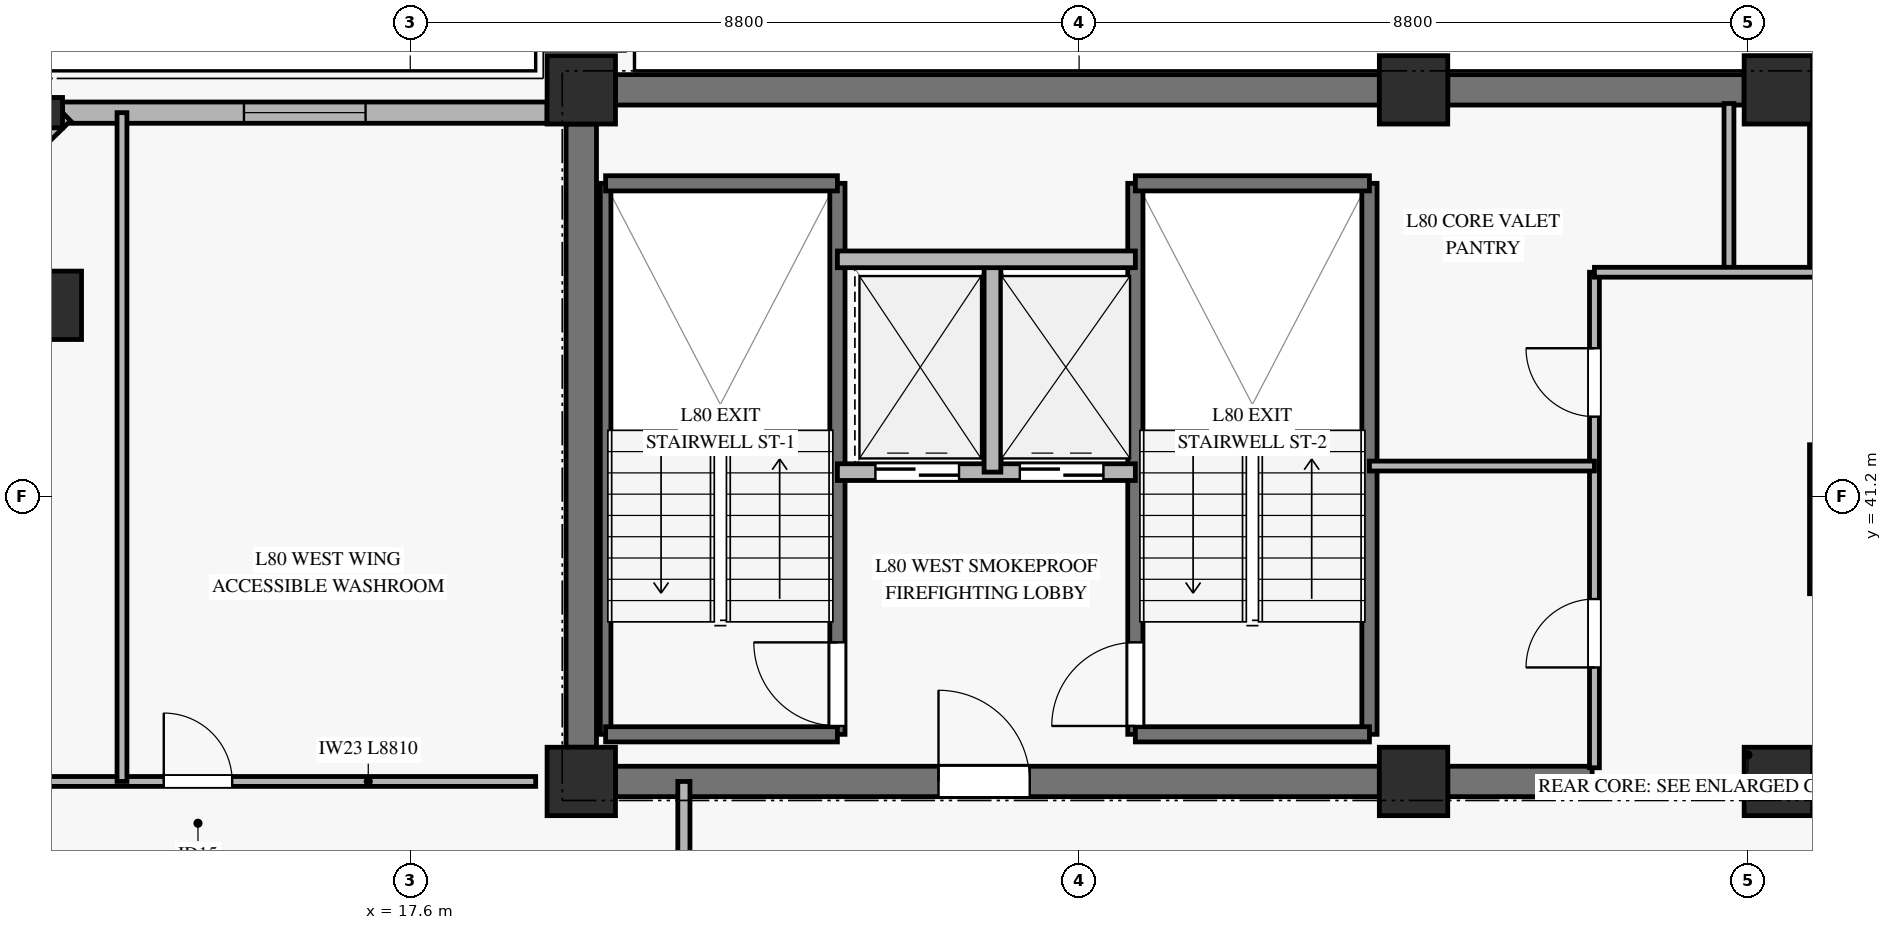
"""IFC4 building model, lengths in metres.
Left out: names, types, materials, properties, quantities, classifications, styles, units other than length and angle.
Written with IfcOpenShell. Run it as: python <this file> out.ifc"""

import sys

from ifc_helpers import new_model, si_unit, direction, frame, frame_2d, origin, origin_2d, place, context, subcontext, project, spatial, rectangle, hollow_rectangle, extrude, source, transform, mapped, element, fill, save


model = new_model("IFC4")
c1 = context("Model", 3, precision=1e-05, world=origin(), true_north=direction((0.0, 1.0)))
c2 = subcontext(c1, "Body", "Model", "MODEL_VIEW")
j1 = project(units=[si_unit("LENGTHUNIT", "METRE"), si_unit("PLANEANGLEUNIT", "RADIAN")], contexts=[c1])
p1 = place(None, origin())
s1 = spatial("IfcSite", under=j1, at=p1, CompositionType="ELEMENT")
p2 = place(p1, origin())
s2 = spatial("IfcBuilding", under=s1, at=p2, CompositionType="ELEMENT")
p3 = place(p2, frame((0.0, 0.0, 310.8)))
s3 = spatial("IfcBuildingStorey", under=s2, at=p3, CompositionType="ELEMENT", Elevation=310.8)
m1 = source(origin(), c2, "Body", "SweptSolid", [
    extrude(rectangle(XDim=0.9, YDim=0.9, at=origin_2d()), origin(), (0.0, 0.0, 1.0), 3.185),
])
for number, where, z_axis, x_axis in (
    (1, (19.85, 37.45, 0.0), (0.0, 0.0, 1.0), (1.0, 0.0, 0.0)),
    (2, (19.85, 46.55, 0.0), (0.0, 0.0, 1.0), (1.0, 0.0, 0.0)),
    (3, (30.8, 37.45, 0.0), (0.0, 0.0, 1.0), (1.0, 0.0, 0.0)),
    (4, (30.8, 46.55, 0.0), (0.0, 0.0, 1.0), (1.0, 0.0, 0.0)),
    (5, (35.6, 37.45, 0.0), (0.0, 0.0, 1.0), (1.0, 0.0, 0.0)),
    (6, (35.6, 46.55, 0.0), (0.0, 0.0, 1.0), (1.0, 0.0, 0.0)),
):
    element("IfcColumn", number, at=place(p3, frame(where, z_axis=z_axis, x_axis=x_axis)), inside=s3, PredefinedType="PILASTER", context=c2, shape_type="MappedRepresentation", body=[
        mapped(m1, transform((0.0, 0.0, 0.0), x_axis=(1.0, 0.0, 0.0), y_axis=(0.0, 1.0, 0.0), z_axis=(0.0, 0.0, 1.0), scale=1.0)),
    ])
p4 = place(p3, frame((20.3, 46.55, 0.0), z_axis=(0.0, 0.0, 1.0), x_axis=(1.0, 0.0, 0.0)))
e7 = element("IfcWall", 7, at=p4, inside=s3, PredefinedType="SHEAR", context=c2, shape_type="SweptSolid", body=[
    extrude(rectangle(XDim=10.05, YDim=0.4, at=frame_2d((5.025, 0.0))), origin(), (0.0, 0.0, 1.0), 3.185),
])
p5 = place(p3, frame((31.25, 46.55, 0.0), z_axis=(0.0, 0.0, 1.0), x_axis=(1.0, 0.0, 0.0)))
e8 = element("IfcWall", 8, at=p5, inside=s3, PredefinedType="SHEAR", context=c2, shape_type="SweptSolid", body=[
    extrude(rectangle(XDim=3.9, YDim=0.4, at=frame_2d((1.95, 0.0))), origin(), (0.0, 0.0, 1.0), 3.185),
])
p6 = place(p3, frame((36.05, 46.55, 0.0), z_axis=(0.0, 0.0, 1.0), x_axis=(1.0, 0.0, 0.0)))
e9 = element("IfcWall", 9, at=p6, inside=s3, PredefinedType="SHEAR", context=c2, shape_type="SweptSolid", body=[
    extrude(rectangle(XDim=7.8, YDim=0.4, at=frame_2d((3.9, 0.0))), origin(), (0.0, 0.0, 1.0), 3.185),
])
p7 = place(p3, frame((20.3, 37.45, 0.0), z_axis=(0.0, 0.0, 1.0), x_axis=(1.0, 0.0, 0.0)))
e10 = element("IfcWall", 10, at=p7, inside=s3, PredefinedType="SHEAR", context=c2, shape_type="SweptSolid", body=[
    extrude(rectangle(XDim=10.05, YDim=0.4, at=frame_2d((5.025, 0.0))), origin(), (0.0, 0.0, 1.0), 3.185),
])
p8 = place(p7, frame((4.25, 0.0, 0.0)))
e11 = element("IfcOpeningElement", 11, at=p8, cuts=e10, PredefinedType="OPENING", context=c2, shape_type="SweptSolid", body=[
    extrude(rectangle(XDim=1.2, YDim=2.15, at=frame_2d((0.6, 1.075))), frame((0.0, 0.21, 0.0), z_axis=(0.0, -1.0, 0.0), x_axis=(1.0, 0.0, 0.0)), (0.0, 0.0, 1.0), 0.42),
])
p9 = place(p3, frame((31.25, 37.45, 0.0), z_axis=(0.0, 0.0, 1.0), x_axis=(1.0, 0.0, 0.0)))
e12 = element("IfcWall", 12, at=p9, inside=s3, PredefinedType="SHEAR", context=c2, shape_type="SweptSolid", body=[
    extrude(rectangle(XDim=1.9, YDim=0.4, at=frame_2d((0.95, 0.0))), origin(), (0.0, 0.0, 1.0), 3.185),
])
p10 = place(p3, frame((36.05, 37.45, 0.0), z_axis=(0.0, 0.0, 1.0), x_axis=(1.0, 0.0, 0.0)))
e13 = element("IfcWall", 13, at=p10, inside=s3, PredefinedType="SHEAR", context=c2, shape_type="SweptSolid", body=[
    extrude(rectangle(XDim=7.8, YDim=0.4, at=frame_2d((3.9, 0.0))), origin(), (0.0, 0.0, 1.0), 3.185),
])
p11 = place(p3, frame((19.85, 37.9, 0.0), z_axis=(0.0, 0.0, 1.0), x_axis=(0.0, 1.0, 0.0)))
e14 = element("IfcWall", 14, at=p11, inside=s3, PredefinedType="SHEAR", context=c2, shape_type="SweptSolid", body=[
    extrude(rectangle(XDim=8.2, YDim=0.4, at=frame_2d((4.1, 0.0))), origin(), (0.0, 0.0, 1.0), 3.185),
])
m2 = source(origin(), c2, "Body", "SweptSolid", [
    extrude(hollow_rectangle(XDim=0.9, YDim=0.9, WallThickness=0.04, at=origin_2d()), origin(), (0.0, 0.0, 1.0), 3.207),
])
p12 = place(p3, frame((12.825, 43.715, 0.0), z_axis=(0.114814147979, 0.014618246958, 0.993279426083), x_axis=(-0.126301358356, 0.991991918756, 0.0)))
e15 = element("IfcColumn", 15, at=p12, inside=s3, PredefinedType="COLUMN", context=c2, shape_type="MappedRepresentation", body=[
    mapped(m2, transform((0.0, 0.0, 0.0), x_axis=(1.0, 0.0, 0.0), y_axis=(0.0, 1.0, 0.0), z_axis=(0.0, 0.0, 1.0), scale=1.0)),
])
m3 = source(origin(), c2, "Body", "SweptSolid", [
    extrude(hollow_rectangle(XDim=0.4, YDim=0.4, WallThickness=0.02, at=origin_2d()), origin(), (0.0, 0.0, 1.0), 3.206),
])
p13 = place(p3, frame((12.825, 46.25, 0.0), z_axis=(0.114826417444, 0.0, 0.993385571597), x_axis=(0.0, 1.0, 0.0)))
e16 = element("IfcColumn", 16, at=p13, inside=s3, PredefinedType="COLUMN", context=c2, shape_type="MappedRepresentation", body=[
    mapped(m3, transform((0.0, 0.0, 0.0), x_axis=(1.0, 0.0, 0.0), y_axis=(0.0, 1.0, 0.0), z_axis=(0.0, 0.0, 1.0), scale=1.0)),
])
p14 = place(p3, frame((13.025, 46.25, 0.0), z_axis=(0.0, 0.0, 1.0), x_axis=(1.0, 0.0, 0.0)))
e17 = element("IfcWall", 17, at=p14, inside=s3, PredefinedType="SOLIDWALL", context=c2, shape_type="SweptSolid", body=[
    extrude(rectangle(XDim=6.375, YDim=0.28, at=frame_2d((3.188, 0.0))), origin(), (0.0, 0.0, 1.0), 2.815),
])
p15 = place(p14, frame((2.387, 0.0, 0.45)))
e18 = element("IfcOpeningElement", 18, at=p15, cuts=e17, PredefinedType="OPENING", context=c2, shape_type="SweptSolid", body=[
    extrude(rectangle(XDim=1.6, YDim=2.0, at=frame_2d((0.8, 1.0))), frame((0.0, 0.15, 0.0), z_axis=(0.0, -1.0, 0.0), x_axis=(1.0, 0.0, 0.0)), (0.0, 0.0, 1.0), 0.3),
])
p16 = place(p3, frame((13.025, 46.25, 0.0), z_axis=(0.0, 0.0, 1.0), x_axis=(-0.713984922877, -0.700161074257, 0.0)))
e19 = element("IfcWall", 19, at=p16, inside=s3, PredefinedType="SOLIDWALL", context=c2, shape_type="SweptSolid", body=[
    extrude(rectangle(XDim=3.62, YDim=0.3, at=frame_2d((1.81, 0.0))), origin(), (0.0, 0.0, 1.0), 2.815),
])
p17 = place(p16, frame((1.01, 0.0, 0.45)))
e20 = element("IfcOpeningElement", 20, at=p17, cuts=e19, PredefinedType="OPENING", context=c2, shape_type="SweptSolid", body=[
    extrude(rectangle(XDim=1.6, YDim=2.0, at=frame_2d((0.8, 1.0))), frame((0.0, 0.16, 0.0), z_axis=(0.0, -1.0, 0.0), x_axis=(1.0, 0.0, 0.0)), (0.0, 0.0, 1.0), 0.32),
])
p18 = place(p3, frame((20.17, 38.07, 0.0), z_axis=(0.0, 0.0, 1.0), x_axis=(0.0, 1.0, 0.0)))
e21 = element("IfcWall", 21, at=p18, inside=s3, PredefinedType="SOLIDWALL", context=c2, shape_type="SweptSolid", body=[
    extrude(rectangle(XDim=7.25, YDim=0.14, at=frame_2d((3.625, 0.0))), origin(), (0.0, 0.0, 1.0), 3.4),
])
p19 = place(p3, frame((23.22, 38.07, 0.0), z_axis=(0.0, 0.0, 1.0), x_axis=(0.0, 1.0, 0.0)))
e22 = element("IfcWall", 22, at=p19, inside=s3, PredefinedType="SOLIDWALL", context=c2, shape_type="SweptSolid", body=[
    extrude(rectangle(XDim=7.25, YDim=0.2, at=frame_2d((3.625, 0.0))), origin(), (0.0, 0.0, 1.0), 3.4),
])
p20 = place(p19, frame((0.11, 0.0, 0.0)))
e23 = element("IfcOpeningElement", 23, at=p20, cuts=e22, PredefinedType="OPENING", context=c2, shape_type="SweptSolid", body=[
    extrude(rectangle(XDim=1.1, YDim=2.15, at=frame_2d((0.55, 1.075))), frame((0.0, 0.11, 0.0), z_axis=(0.0, -1.0, 0.0), x_axis=(1.0, 0.0, 0.0)), (0.0, 0.0, 1.0), 0.22),
])
for number, where, z_axis, x_axis in (
    (24, (20.17, 45.32, 0.0), (0.0, 0.0, 1.0), (1.0, 0.0, 0.0)),
    (25, (20.17, 38.07, 0.0), (0.0, 0.0, 1.0), (1.0, 0.0, 0.0)),
):
    element("IfcWall", number, at=place(p3, frame(where, z_axis=z_axis, x_axis=x_axis)), inside=s3, PredefinedType="SOLIDWALL", context=c2, shape_type="SweptSolid", body=[
        extrude(rectangle(XDim=3.05, YDim=0.2, at=frame_2d((1.525, 0.0))), origin(), (0.0, 0.0, 1.0), 3.4),
    ])
p21 = place(p3, frame((27.14, 38.07, 0.0), z_axis=(0.0, 0.0, 1.0), x_axis=(0.0, 1.0, 0.0)))
e26 = element("IfcWall", 26, at=p21, inside=s3, PredefinedType="SOLIDWALL", context=c2, shape_type="SweptSolid", body=[
    extrude(rectangle(XDim=7.25, YDim=0.2, at=frame_2d((3.625, 0.0))), origin(), (0.0, 0.0, 1.0), 3.4),
])
p22 = place(p21, frame((0.11, 0.0, 0.0)))
e27 = element("IfcOpeningElement", 27, at=p22, cuts=e26, PredefinedType="OPENING", context=c2, shape_type="SweptSolid", body=[
    extrude(rectangle(XDim=1.1, YDim=2.15, at=frame_2d((0.55, 1.075))), frame((0.0, 0.11, 0.0), z_axis=(0.0, -1.0, 0.0), x_axis=(1.0, 0.0, 0.0)), (0.0, 0.0, 1.0), 0.22),
])
p23 = place(p3, frame((30.22, 38.07, 0.0), z_axis=(0.0, 0.0, 1.0), x_axis=(0.0, 1.0, 0.0)))
e28 = element("IfcWall", 28, at=p23, inside=s3, PredefinedType="SOLIDWALL", context=c2, shape_type="SweptSolid", body=[
    extrude(rectangle(XDim=7.25, YDim=0.2, at=frame_2d((3.625, 0.0))), origin(), (0.0, 0.0, 1.0), 3.4),
])
for number, where, z_axis, x_axis in (
    (29, (27.14, 45.32, 0.0), (0.0, 0.0, 1.0), (1.0, 0.0, 0.0)),
    (30, (27.14, 38.07, 0.0), (0.0, 0.0, 1.0), (1.0, 0.0, 0.0)),
):
    element("IfcWall", number, at=place(p3, frame(where, z_axis=z_axis, x_axis=x_axis)), inside=s3, PredefinedType="SOLIDWALL", context=c2, shape_type="SweptSolid", body=[
        extrude(rectangle(XDim=3.08, YDim=0.2, at=frame_2d((1.54, 0.0))), origin(), (0.0, 0.0, 1.0), 3.4),
    ])
p24 = place(p3, frame((23.22, 41.52, 0.0), z_axis=(0.0, 0.0, 1.0), x_axis=(1.0, 0.0, 0.0)))
e31 = element("IfcWall", 31, at=p24, inside=s3, PredefinedType="SOLIDWALL", context=c2, shape_type="SweptSolid", body=[
    extrude(rectangle(XDim=3.92, YDim=0.22, at=frame_2d((1.96, 0.0))), origin(), (0.0, 0.0, 1.0), 3.185),
])
p25 = place(p24, frame((0.5, 0.0, 0.0)))
e32 = element("IfcOpeningElement", 32, at=p25, cuts=e31, PredefinedType="OPENING", context=c2, shape_type="SweptSolid", body=[
    extrude(rectangle(XDim=1.1, YDim=2.2, at=frame_2d((0.55, 1.1))), frame((0.0, 0.12, 0.0), z_axis=(0.0, -1.0, 0.0), x_axis=(1.0, 0.0, 0.0)), (0.0, 0.0, 1.0), 0.24),
])
p26 = place(p24, frame((2.4, 0.0, 0.0)))
e33 = element("IfcOpeningElement", 33, at=p26, cuts=e31, PredefinedType="OPENING", context=c2, shape_type="SweptSolid", body=[
    extrude(rectangle(XDim=1.1, YDim=2.2, at=frame_2d((0.55, 1.1))), frame((0.0, 0.12, 0.0), z_axis=(0.0, -1.0, 0.0), x_axis=(1.0, 0.0, 0.0)), (0.0, 0.0, 1.0), 0.24),
])
p27 = place(p3, frame((25.26, 41.52, 0.0), z_axis=(0.0, 0.0, 1.0), x_axis=(0.0, 1.0, 0.0)))
e34 = element("IfcWall", 34, at=p27, inside=s3, PredefinedType="SOLIDWALL", context=c2, shape_type="SweptSolid", body=[
    extrude(rectangle(XDim=2.8, YDim=0.22, at=frame_2d((1.4, 0.0))), origin(), (0.0, 0.0, 1.0), 3.185),
])
p28 = place(p3, frame((23.22, 44.32, 0.0), z_axis=(0.0, 0.0, 1.0), x_axis=(1.0, 0.0, 0.0)))
e35 = element("IfcWall", 35, at=p28, inside=s3, PredefinedType="SOLIDWALL", context=c2, shape_type="SweptSolid", body=[
    extrude(rectangle(XDim=3.92, YDim=0.22, at=frame_2d((1.96, 0.0))), origin(), (0.0, 0.0, 1.0), 3.185),
])
p29 = place(p3, frame((36.12, 39.92, 0.0), z_axis=(0.0, 0.0, 1.0), x_axis=(0.0, 1.0, 0.0)))
e36 = element("IfcWall", 36, at=p29, inside=s3, PredefinedType="SOLIDWALL", context=c2, shape_type="SweptSolid", body=[
    extrude(rectangle(XDim=1.96, YDim=0.22, at=frame_2d((0.98, 0.0))), origin(), (0.0, 0.0, 1.0), 3.185),
])
p30 = place(p3, frame((36.12, 44.22, 0.0), z_axis=(0.0, 0.0, 1.0), x_axis=(0.0, 1.0, 0.0)))
e37 = element("IfcWall", 37, at=p30, inside=s3, PredefinedType="SOLIDWALL", context=c2, shape_type="SweptSolid", body=[
    extrude(rectangle(XDim=2.15, YDim=0.22, at=frame_2d((1.075, 0.0))), origin(), (0.0, 0.0, 1.0), 3.185),
])
p31 = place(p3, frame((33.18, 37.63, 0.0), z_axis=(0.0, 0.0, 1.0), x_axis=(0.0, 1.0, 0.0)))
e38 = element("IfcWall", 38, at=p31, inside=s3, PredefinedType="PARTITIONING", context=c2, shape_type="SweptSolid", body=[
    extrude(rectangle(XDim=6.52, YDim=0.13, at=frame_2d((3.26, 0.0))), origin(), (0.0, 0.0, 1.0), 2.27),
])
p32 = place(p31, frame((1.32, 0.0, 0.0)))
e39 = element("IfcOpeningElement", 39, at=p32, cuts=e38, PredefinedType="OPENING", context=c2, shape_type="SweptSolid", body=[
    extrude(rectangle(XDim=0.9, YDim=2.1, at=frame_2d((0.45, 1.05))), frame((0.0, 0.075, 0.0), z_axis=(0.0, -1.0, 0.0), x_axis=(1.0, 0.0, 0.0)), (0.0, 0.0, 1.0), 0.15),
])
p33 = place(p31, frame((4.62, 0.0, 0.0)))
e40 = element("IfcOpeningElement", 40, at=p33, cuts=e38, PredefinedType="OPENING", context=c2, shape_type="SweptSolid", body=[
    extrude(rectangle(XDim=0.9, YDim=2.1, at=frame_2d((0.45, 1.05))), frame((0.0, 0.075, 0.0), z_axis=(0.0, -1.0, 0.0), x_axis=(1.0, 0.0, 0.0)), (0.0, 0.0, 1.0), 0.15),
])
p34 = place(p3, frame((34.95, 44.15, 0.0), z_axis=(0.0, 0.0, 1.0), x_axis=(0.0, 1.0, 0.0)))
e41 = element("IfcWall", 41, at=p34, inside=s3, PredefinedType="PARTITIONING", context=c2, shape_type="SweptSolid", body=[
    extrude(rectangle(XDim=2.22, YDim=0.13, at=frame_2d((1.11, 0.0))), origin(), (0.0, 0.0, 1.0), 3.185),
])
p35 = place(p3, frame((33.18, 44.15, 0.0), z_axis=(0.0, 0.0, 1.0), x_axis=(1.0, 0.0, 0.0)))
e42 = element("IfcWall", 42, at=p35, inside=s3, PredefinedType="PARTITIONING", context=c2, shape_type="SweptSolid", body=[
    extrude(rectangle(XDim=2.94, YDim=0.13, at=frame_2d((1.47, 0.0))), origin(), (0.0, 0.0, 1.0), 2.47),
])
p36 = place(p3, frame((30.22, 41.6, 0.0), z_axis=(0.0, 0.0, 1.0), x_axis=(1.0, 0.0, 0.0)))
e43 = element("IfcWall", 43, at=p36, inside=s3, PredefinedType="PARTITIONING", context=c2, shape_type="SweptSolid", body=[
    extrude(rectangle(XDim=2.96, YDim=0.13, at=frame_2d((1.48, 0.0))), origin(), (0.0, 0.0, 1.0), 2.47),
])
p37 = place(p3, frame((21.2, 19.772, 0.0), z_axis=(0.0, 0.0, 1.0), x_axis=(0.0, 1.0, 0.0)))
e44 = element("IfcWall", 44, at=p37, inside=s3, PredefinedType="PARTITIONING", context=c2, shape_type="SweptSolid", body=[
    extrude(rectangle(XDim=17.678, YDim=0.16, at=frame_2d((8.839, 0.0))), origin(), (0.0, 0.0, 1.0), 2.77),
])
p38 = place(p37, frame((15.348, 0.0, 0.0)))
e45 = element("IfcOpeningElement", 45, at=p38, cuts=e44, PredefinedType="OPENING", context=c2, shape_type="SweptSolid", body=[
    extrude(rectangle(XDim=1.05, YDim=2.15, at=frame_2d((0.525, 1.075))), frame((0.0, 0.09, 0.0), z_axis=(0.0, -1.0, 0.0), x_axis=(1.0, 0.0, 0.0)), (0.0, 0.0, 1.0), 0.18),
])
p39 = place(p3, frame((10.44, 37.45, 0.0), z_axis=(0.0, 0.0, 1.0), x_axis=(1.0, 0.0, 0.0)))
e46 = element("IfcWall", 46, at=p39, inside=s3, PredefinedType="PARTITIONING", context=c2, shape_type="SweptSolid", body=[
    extrude(rectangle(XDim=8.81, YDim=0.13, at=frame_2d((4.405, 0.0))), origin(), (0.0, 0.0, 1.0), 2.82),
])
p40 = place(p39, frame((1.315, 0.0, 0.0)))
e47 = element("IfcOpeningElement", 47, at=p40, cuts=e46, PredefinedType="OPENING", context=c2, shape_type="SweptSolid", body=[
    extrude(rectangle(XDim=0.95, YDim=2.1, at=frame_2d((0.475, 1.05))), frame((0.0, 0.075, 0.0), z_axis=(0.0, -1.0, 0.0), x_axis=(1.0, 0.0, 0.0)), (0.0, 0.0, 1.0), 0.15),
])
p41 = place(p39, frame((3.917, 0.0, 0.0)))
e48 = element("IfcOpeningElement", 48, at=p41, cuts=e46, PredefinedType="OPENING", context=c2, shape_type="SweptSolid", body=[
    extrude(rectangle(XDim=0.9, YDim=2.1, at=frame_2d((0.45, 1.05))), frame((0.0, 0.075, 0.0), z_axis=(0.0, -1.0, 0.0), x_axis=(1.0, 0.0, 0.0)), (0.0, 0.0, 1.0), 0.15),
])
p42 = place(p3, frame((13.807, 37.45, 0.0), z_axis=(0.0, 0.0, 1.0), x_axis=(0.0, 1.0, 0.0)))
e49 = element("IfcWall", 49, at=p42, inside=s3, PredefinedType="PARTITIONING", context=c2, shape_type="SweptSolid", body=[
    extrude(rectangle(XDim=8.8, YDim=0.13, at=frame_2d((4.4, 0.0))), origin(), (0.0, 0.0, 1.0), 3.185),
])
m4 = source(origin(), c2, "Body", "SweptSolid", [
    extrude(rectangle(XDim=1.6, YDim=2.0, at=frame_2d((0.8, 1.0))), frame((0.0, 0.03, 0.0), z_axis=(0.0, -1.0, 0.0), x_axis=(1.0, 0.0, 0.0)), (0.0, 0.0, 1.0), 0.06),
])
p43 = place(p15, origin())
e50 = element("IfcWindow", 50, at=p43, inside=s3, PartitioningType="SINGLE_PANEL", PredefinedType="WINDOW", context=c2, shape_type="MappedRepresentation", body=[
    mapped(m4, transform((0.0, 0.0, 0.0), x_axis=(1.0, 0.0, 0.0), y_axis=(0.0, 1.0, 0.0), z_axis=(0.0, 0.0, 1.0), scale=1.0)),
])
fill(e18, e50)
m5 = source(origin(), c2, "Body", "SweptSolid", [
    extrude(rectangle(XDim=1.1, YDim=2.15, at=frame_2d((0.55, 1.075))), frame((0.0, 0.025, 0.0), z_axis=(0.0, -1.0, 0.0), x_axis=(1.0, 0.0, 0.0)), (0.0, 0.0, 1.0), 0.05),
])
p44 = place(p20, origin())
e51 = element("IfcDoor", 51, at=p44, inside=s3, OperationType="SINGLE_SWING_RIGHT", PredefinedType="DOOR", context=c2, shape_type="MappedRepresentation", body=[
    mapped(m5, transform((0.0, 0.0, 0.0), x_axis=(1.0, 0.0, 0.0), y_axis=(0.0, 1.0, 0.0), z_axis=(0.0, 0.0, 1.0), scale=1.0)),
])
fill(e23, e51)
p45 = place(p22, origin())
e52 = element("IfcDoor", 52, at=p45, inside=s3, OperationType="SINGLE_SWING_LEFT", PredefinedType="DOOR", context=c2, shape_type="MappedRepresentation", body=[
    mapped(m5, transform((0.0, 0.0, 0.0), x_axis=(1.0, 0.0, 0.0), y_axis=(0.0, 1.0, 0.0), z_axis=(0.0, 0.0, 1.0), scale=1.0)),
])
fill(e27, e52)
m6 = source(origin(), c2, "Body", "SweptSolid", [
    extrude(rectangle(XDim=1.1, YDim=2.2, at=frame_2d((0.55, 1.1))), frame((0.0, 0.025, 0.0), z_axis=(0.0, -1.0, 0.0), x_axis=(1.0, 0.0, 0.0)), (0.0, 0.0, 1.0), 0.05),
])
p46 = place(p25, origin())
e53 = element("IfcDoor", 53, at=p46, inside=s3, OperationType="SLIDING_TO_LEFT", PredefinedType="DOOR", context=c2, shape_type="MappedRepresentation", body=[
    mapped(m6, transform((0.0, 0.0, 0.0), x_axis=(1.0, 0.0, 0.0), y_axis=(0.0, 1.0, 0.0), z_axis=(0.0, 0.0, 1.0), scale=1.0)),
])
fill(e32, e53)
p47 = place(p26, origin())
e54 = element("IfcDoor", 54, at=p47, inside=s3, OperationType="SLIDING_TO_LEFT", PredefinedType="DOOR", context=c2, shape_type="MappedRepresentation", body=[
    mapped(m6, transform((0.0, 0.0, 0.0), x_axis=(1.0, 0.0, 0.0), y_axis=(0.0, 1.0, 0.0), z_axis=(0.0, 0.0, 1.0), scale=1.0)),
])
fill(e33, e54)
m7 = source(origin(), c2, "Body", "SweptSolid", [
    extrude(rectangle(XDim=1.2, YDim=2.15, at=frame_2d((0.6, 1.075))), frame((0.0, 0.025, 0.0), z_axis=(0.0, -1.0, 0.0), x_axis=(1.0, 0.0, 0.0)), (0.0, 0.0, 1.0), 0.05),
])
p48 = place(p8, origin())
e55 = element("IfcDoor", 55, at=p48, inside=s3, OperationType="SINGLE_SWING_LEFT", PredefinedType="DOOR", context=c2, shape_type="MappedRepresentation", body=[
    mapped(m7, transform((0.0, 0.0, 0.0), x_axis=(1.0, 0.0, 0.0), y_axis=(0.0, 1.0, 0.0), z_axis=(0.0, 0.0, 1.0), scale=1.0)),
])
fill(e11, e55)
m8 = source(origin(), c2, "Body", "SweptSolid", [
    extrude(rectangle(XDim=0.9, YDim=2.1, at=frame_2d((0.45, 1.05))), frame((0.0, 0.025, 0.0), z_axis=(0.0, -1.0, 0.0), x_axis=(1.0, 0.0, 0.0)), (0.0, 0.0, 1.0), 0.05),
])
p49 = place(p32, origin())
e56 = element("IfcDoor", 56, at=p49, inside=s3, OperationType="SINGLE_SWING_LEFT", PredefinedType="DOOR", context=c2, shape_type="MappedRepresentation", body=[
    mapped(m8, transform((0.0, 0.0, 0.0), x_axis=(1.0, 0.0, 0.0), y_axis=(0.0, 1.0, 0.0), z_axis=(0.0, 0.0, 1.0), scale=1.0)),
])
fill(e39, e56)
p50 = place(p33, origin())
e57 = element("IfcDoor", 57, at=p50, inside=s3, OperationType="SINGLE_SWING_RIGHT", PredefinedType="DOOR", context=c2, shape_type="MappedRepresentation", body=[
    mapped(m8, transform((0.0, 0.0, 0.0), x_axis=(1.0, 0.0, 0.0), y_axis=(0.0, 1.0, 0.0), z_axis=(0.0, 0.0, 1.0), scale=1.0)),
])
fill(e40, e57)
p51 = place(p41, origin())
e58 = element("IfcDoor", 58, at=p51, inside=s3, OperationType="SINGLE_SWING_LEFT", PredefinedType="DOOR", context=c2, shape_type="MappedRepresentation", body=[
    mapped(m8, transform((0.0, 0.0, 0.0), x_axis=(1.0, 0.0, 0.0), y_axis=(0.0, 1.0, 0.0), z_axis=(0.0, 0.0, 1.0), scale=1.0)),
])
fill(e48, e58)
save(model, sys.argv[1])
